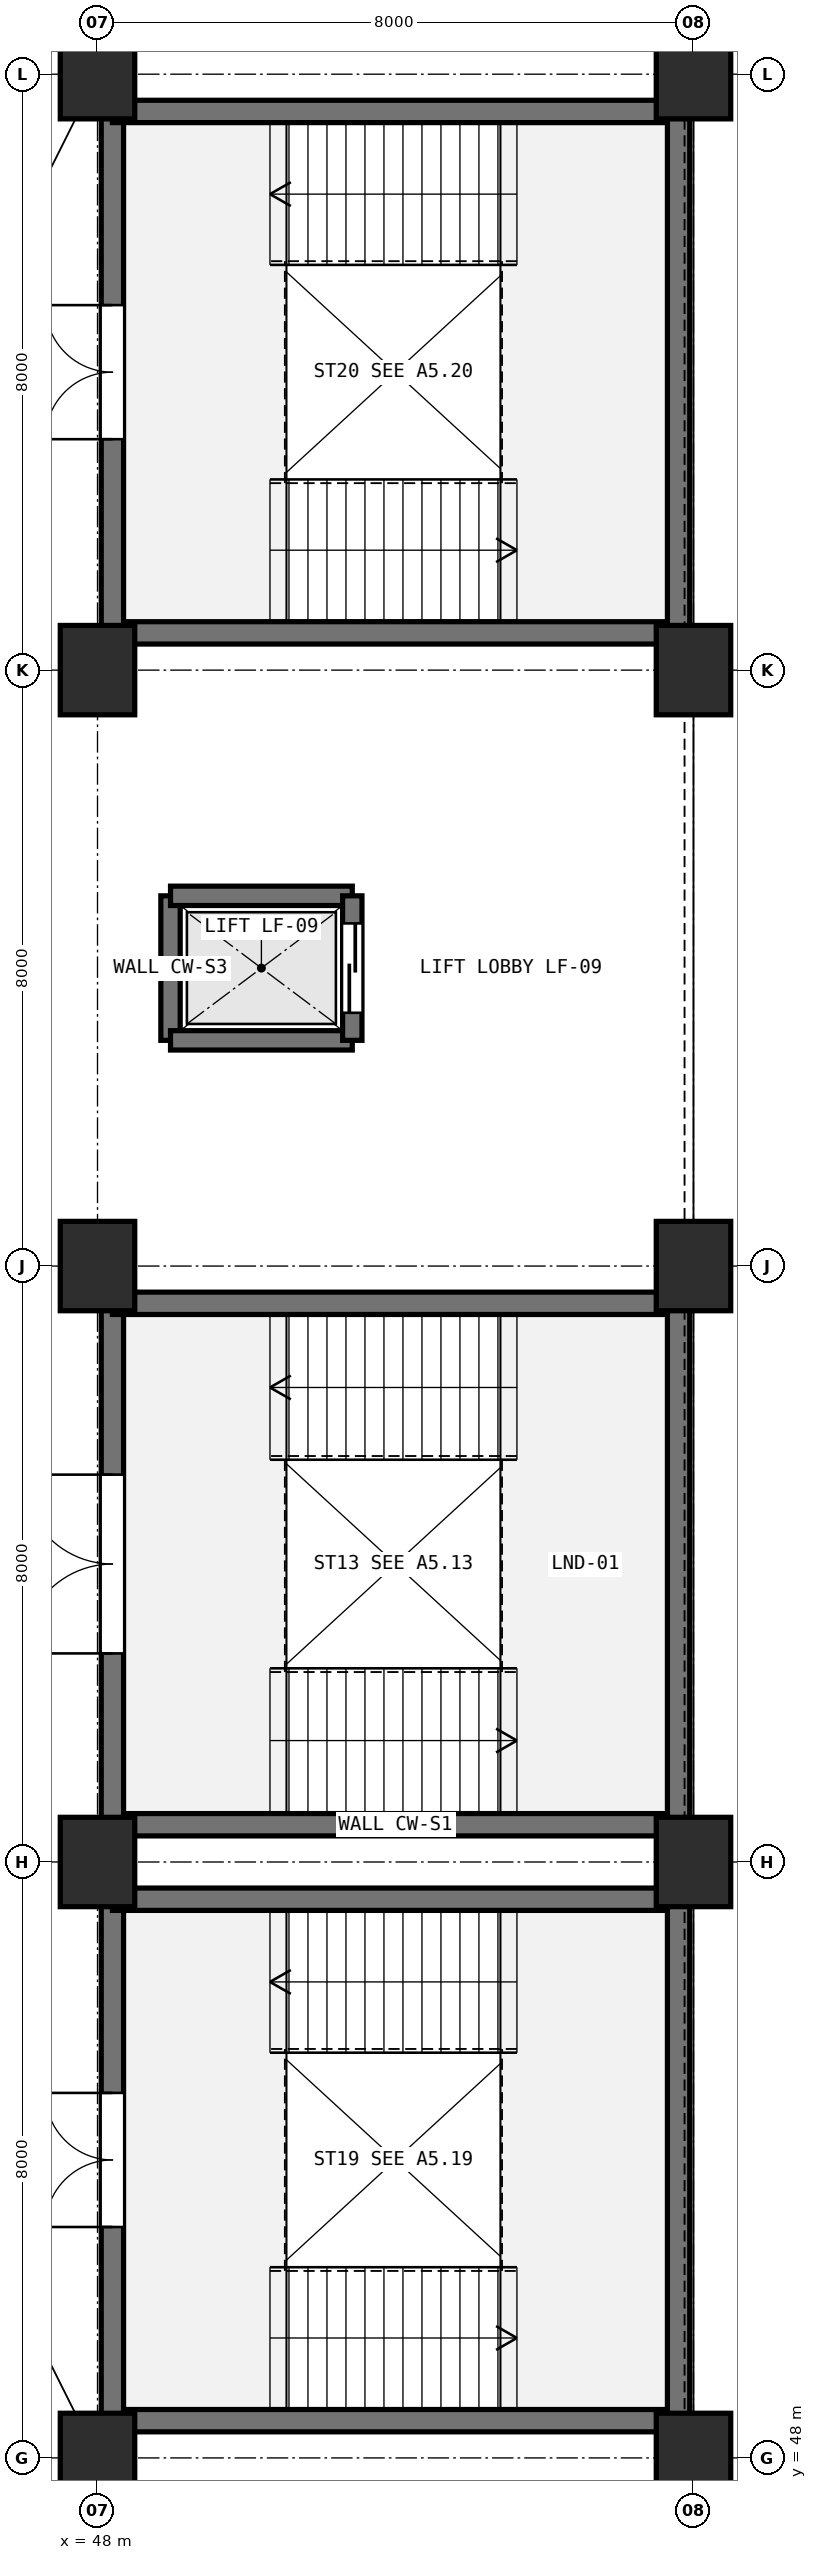
"""IFC4 building model, lengths in metres.
Left out: names, types, materials, properties, quantities, classifications, styles, units other than length and angle.
Written with IfcOpenShell. Run it as: python <this file> out.ifc"""

import sys

from ifc_helpers import new_model, si_unit, direction, frame, frame_2d, origin, origin_2d, place, context, subcontext, project, spatial, rectangle, extrude, element, fill, save


model = new_model("IFC4")
c1 = context("Model", 3, precision=1e-05, world=origin(), true_north=direction((0.0, 1.0)))
c2 = subcontext(c1, "Body", "Model", "MODEL_VIEW")
j1 = project(units=[si_unit("LENGTHUNIT", "METRE"), si_unit("PLANEANGLEUNIT", "RADIAN")], contexts=[c1])
p1 = place(None, origin())
s1 = spatial("IfcSite", under=j1, at=p1, CompositionType="ELEMENT")
p2 = place(p1, origin())
s2 = spatial("IfcBuilding", under=s1, at=p2, CompositionType="ELEMENT")
p3 = place(p2, frame((0.0, 0.0, 10.2)))
s3 = spatial("IfcBuildingStorey", under=s2, at=p3, CompositionType="ELEMENT", Elevation=10.2)
for number, where, z_axis, x_axis in (
    (1, (48.0, 48.0, 0.0), (0.0, 0.0, 1.0), (1.0, 0.0, 0.0)),
    (2, (48.0, 56.0, 0.0), (0.0, 0.0, 1.0), (1.0, 0.0, 0.0)),
    (3, (48.0, 64.0, 0.0), (0.0, 0.0, 1.0), (1.0, 0.0, 0.0)),
    (4, (48.0, 72.0, 0.0), (0.0, 0.0, 1.0), (1.0, 0.0, 0.0)),
    (5, (48.0, 80.0, 0.0), (0.0, 0.0, 1.0), (1.0, 0.0, 0.0)),
    (6, (56.0, 48.0, 0.0), (0.0, 0.0, 1.0), (1.0, 0.0, 0.0)),
    (7, (56.0, 56.0, 0.0), (0.0, 0.0, 1.0), (1.0, 0.0, 0.0)),
    (8, (56.0, 64.0, 0.0), (0.0, 0.0, 1.0), (1.0, 0.0, 0.0)),
    (9, (56.0, 72.0, 0.0), (0.0, 0.0, 1.0), (1.0, 0.0, 0.0)),
    (10, (56.0, 80.0, 0.0), (0.0, 0.0, 1.0), (1.0, 0.0, 0.0)),
):
    element("IfcColumn", number, at=place(p3, frame(where, z_axis=z_axis, x_axis=x_axis)), inside=s3, PredefinedType="COLUMN", context=c2, shape_type="SweptSolid", body=[
        extrude(rectangle(XDim=1.0, YDim=1.2, at=origin_2d()), origin(), (0.0, 0.0, 1.0), 4.8),
    ])
p4 = place(p3, frame((55.8, 56.5, 0.0), z_axis=(0.0, 0.0, 1.0), x_axis=(-1.0, 0.0, 0.0)))
e11 = element("IfcWall", 11, at=p4, inside=s3, PredefinedType="SHEAR", context=c2, shape_type="SweptSolid", body=[
    extrude(rectangle(XDim=7.6, YDim=0.3, at=frame_2d((3.8, 0.0))), origin(), (0.0, 0.0, 1.0), 4.46),
])
p5 = place(p3, frame((48.2, 56.5, 0.0), z_axis=(0.0, 0.0, 1.0), x_axis=(0.0, 1.0, 0.0)))
e12 = element("IfcWall", 12, at=p5, inside=s3, PredefinedType="SHEAR", context=c2, shape_type="SweptSolid", body=[
    extrude(rectangle(XDim=7.0, YDim=0.3, at=frame_2d((3.5, 0.0))), origin(), (0.0, 0.0, 1.0), 4.46),
])
p6 = place(p5, frame((2.3, 0.0, 0.0)))
e13 = element("IfcOpeningElement", 13, at=p6, cuts=e12, PredefinedType="OPENING", context=c2, shape_type="SweptSolid", body=[
    extrude(rectangle(XDim=2.4, YDim=2.2, at=frame_2d((1.2, 1.1))), frame((0.0, 0.16, 0.0), z_axis=(0.0, -1.0, 0.0), x_axis=(1.0, 0.0, 0.0)), (0.0, 0.0, 1.0), 0.32),
])
p7 = place(p3, frame((48.2, 63.5, 0.0), z_axis=(0.0, 0.0, 1.0), x_axis=(1.0, 0.0, 0.0)))
e14 = element("IfcWall", 14, at=p7, inside=s3, PredefinedType="SHEAR", context=c2, shape_type="SweptSolid", body=[
    extrude(rectangle(XDim=7.6, YDim=0.3, at=frame_2d((3.8, 0.0))), origin(), (0.0, 0.0, 1.0), 4.46),
])
p8 = place(p3, frame((55.8, 63.5, 0.0), z_axis=(0.0, 0.0, 1.0), x_axis=(0.0, -1.0, 0.0)))
e15 = element("IfcWall", 15, at=p8, inside=s3, PredefinedType="SHEAR", context=c2, shape_type="SweptSolid", body=[
    extrude(rectangle(XDim=7.0, YDim=0.3, at=frame_2d((3.5, 0.0))), origin(), (0.0, 0.0, 1.0), 4.46),
])
p9 = place(p3, frame((55.8, 48.5, 0.0), z_axis=(0.0, 0.0, 1.0), x_axis=(-1.0, 0.0, 0.0)))
e16 = element("IfcWall", 16, at=p9, inside=s3, PredefinedType="SHEAR", context=c2, shape_type="SweptSolid", body=[
    extrude(rectangle(XDim=7.6, YDim=0.3, at=frame_2d((3.8, 0.0))), origin(), (0.0, 0.0, 1.0), 4.46),
])
p10 = place(p3, frame((48.2, 48.5, 0.0), z_axis=(0.0, 0.0, 1.0), x_axis=(0.0, 1.0, 0.0)))
e17 = element("IfcWall", 17, at=p10, inside=s3, PredefinedType="SHEAR", context=c2, shape_type="SweptSolid", body=[
    extrude(rectangle(XDim=7.0, YDim=0.3, at=frame_2d((3.5, 0.0))), origin(), (0.0, 0.0, 1.0), 4.46),
])
p11 = place(p10, frame((2.6, 0.0, 0.0)))
e18 = element("IfcOpeningElement", 18, at=p11, cuts=e17, PredefinedType="OPENING", context=c2, shape_type="SweptSolid", body=[
    extrude(rectangle(XDim=1.8, YDim=2.2, at=frame_2d((0.9, 1.1))), frame((0.0, 0.16, 0.0), z_axis=(0.0, -1.0, 0.0), x_axis=(1.0, 0.0, 0.0)), (0.0, 0.0, 1.0), 0.32),
])
p12 = place(p3, frame((48.2, 55.5, 0.0), z_axis=(0.0, 0.0, 1.0), x_axis=(1.0, 0.0, 0.0)))
e19 = element("IfcWall", 19, at=p12, inside=s3, PredefinedType="SHEAR", context=c2, shape_type="SweptSolid", body=[
    extrude(rectangle(XDim=7.6, YDim=0.3, at=frame_2d((3.8, 0.0))), origin(), (0.0, 0.0, 1.0), 4.46),
])
p13 = place(p3, frame((55.8, 55.5, 0.0), z_axis=(0.0, 0.0, 1.0), x_axis=(0.0, -1.0, 0.0)))
e20 = element("IfcWall", 20, at=p13, inside=s3, PredefinedType="SHEAR", context=c2, shape_type="SweptSolid", body=[
    extrude(rectangle(XDim=7.0, YDim=0.3, at=frame_2d((3.5, 0.0))), origin(), (0.0, 0.0, 1.0), 4.46),
])
p14 = place(p3, frame((55.8, 72.5, 0.0), z_axis=(0.0, 0.0, 1.0), x_axis=(-1.0, 0.0, 0.0)))
e21 = element("IfcWall", 21, at=p14, inside=s3, PredefinedType="SHEAR", context=c2, shape_type="SweptSolid", body=[
    extrude(rectangle(XDim=7.6, YDim=0.3, at=frame_2d((3.8, 0.0))), origin(), (0.0, 0.0, 1.0), 4.46),
])
p15 = place(p3, frame((48.2, 72.5, 0.0), z_axis=(0.0, 0.0, 1.0), x_axis=(0.0, 1.0, 0.0)))
e22 = element("IfcWall", 22, at=p15, inside=s3, PredefinedType="SHEAR", context=c2, shape_type="SweptSolid", body=[
    extrude(rectangle(XDim=7.0, YDim=0.3, at=frame_2d((3.5, 0.0))), origin(), (0.0, 0.0, 1.0), 4.46),
])
p16 = place(p15, frame((2.6, 0.0, 0.0)))
e23 = element("IfcOpeningElement", 23, at=p16, cuts=e22, PredefinedType="OPENING", context=c2, shape_type="SweptSolid", body=[
    extrude(rectangle(XDim=1.8, YDim=2.2, at=frame_2d((0.9, 1.1))), frame((0.0, 0.16, 0.0), z_axis=(0.0, -1.0, 0.0), x_axis=(1.0, 0.0, 0.0)), (0.0, 0.0, 1.0), 0.32),
])
p17 = place(p3, frame((48.2, 79.5, 0.0), z_axis=(0.0, 0.0, 1.0), x_axis=(1.0, 0.0, 0.0)))
e24 = element("IfcWall", 24, at=p17, inside=s3, PredefinedType="SHEAR", context=c2, shape_type="SweptSolid", body=[
    extrude(rectangle(XDim=7.6, YDim=0.3, at=frame_2d((3.8, 0.0))), origin(), (0.0, 0.0, 1.0), 4.46),
])
p18 = place(p3, frame((55.8, 79.5, 0.0), z_axis=(0.0, 0.0, 1.0), x_axis=(0.0, -1.0, 0.0)))
e25 = element("IfcWall", 25, at=p18, inside=s3, PredefinedType="SHEAR", context=c2, shape_type="SweptSolid", body=[
    extrude(rectangle(XDim=7.0, YDim=0.3, at=frame_2d((3.5, 0.0))), origin(), (0.0, 0.0, 1.0), 4.46),
])
p19 = place(p3, frame((48.98, 67.03, 0.0), z_axis=(0.0, 0.0, 1.0), x_axis=(0.0, 1.0, 0.0)))
e26 = element("IfcWall", 26, at=p19, inside=s3, PredefinedType="SHEAR", context=c2, shape_type="SweptSolid", body=[
    extrude(rectangle(XDim=1.94, YDim=0.26, at=frame_2d((0.97, 0.0))), origin(), (0.0, 0.0, 1.0), 4.46),
])
for number, where, z_axis, x_axis in (
    (27, (48.98, 68.97, 0.0), (0.0, 0.0, 1.0), (1.0, 0.0, 0.0)),
    (28, (51.42, 67.03, 0.0), (0.0, 0.0, 1.0), (-1.0, 0.0, 0.0)),
):
    element("IfcWall", number, at=place(p3, frame(where, z_axis=z_axis, x_axis=x_axis)), inside=s3, PredefinedType="SHEAR", context=c2, shape_type="SweptSolid", body=[
        extrude(rectangle(XDim=2.44, YDim=0.26, at=frame_2d((1.22, 0.0))), origin(), (0.0, 0.0, 1.0), 4.46),
    ])
p20 = place(p3, frame((51.42, 68.97, 0.0), z_axis=(0.0, 0.0, 1.0), x_axis=(0.0, -1.0, 0.0)))
e29 = element("IfcWall", 29, at=p20, inside=s3, PredefinedType="SHEAR", context=c2, shape_type="SweptSolid", body=[
    extrude(rectangle(XDim=1.94, YDim=0.26, at=frame_2d((0.97, 0.0))), origin(), (0.0, 0.0, 1.0), 4.46),
])
p21 = place(p20, frame((0.37, 0.0, 0.0)))
e30 = element("IfcOpeningElement", 30, at=p21, cuts=e29, PredefinedType="OPENING", context=c2, shape_type="SweptSolid", body=[
    extrude(rectangle(XDim=1.2, YDim=2.15, at=frame_2d((0.6, 1.075))), frame((0.0, 0.14, 0.0), z_axis=(0.0, -1.0, 0.0), x_axis=(1.0, 0.0, 0.0)), (0.0, 0.0, 1.0), 0.28),
])
p22 = place(p6, frame((2.4, 0.0, 0.0), z_axis=(0.0, 0.0, 1.0), x_axis=(-1.0, 0.0, 0.0)))
e31 = element("IfcDoor", 31, at=p22, inside=s3, OperationType="DOUBLE_DOOR_SINGLE_SWING", PredefinedType="DOOR", context=c2, shape_type="SweptSolid", body=[
    extrude(rectangle(XDim=2.4, YDim=2.2, at=frame_2d((1.2, 1.1))), frame((0.0, 0.025, 0.0), z_axis=(0.0, -1.0, 0.0), x_axis=(1.0, 0.0, 0.0)), (0.0, 0.0, 1.0), 0.05),
])
fill(e13, e31)
p23 = place(p11, frame((1.8, 0.0, 0.0), z_axis=(0.0, 0.0, 1.0), x_axis=(-1.0, 0.0, 0.0)))
e32 = element("IfcDoor", 32, at=p23, inside=s3, OperationType="DOUBLE_DOOR_SINGLE_SWING", PredefinedType="DOOR", context=c2, shape_type="SweptSolid", body=[
    extrude(rectangle(XDim=1.8, YDim=2.2, at=frame_2d((0.9, 1.1))), frame((0.0, 0.025, 0.0), z_axis=(0.0, -1.0, 0.0), x_axis=(1.0, 0.0, 0.0)), (0.0, 0.0, 1.0), 0.05),
])
fill(e18, e32)
p24 = place(p16, frame((1.8, 0.0, 0.0), z_axis=(0.0, 0.0, 1.0), x_axis=(-1.0, 0.0, 0.0)))
e33 = element("IfcDoor", 33, at=p24, inside=s3, OperationType="DOUBLE_DOOR_SINGLE_SWING", PredefinedType="DOOR", context=c2, shape_type="SweptSolid", body=[
    extrude(rectangle(XDim=1.8, YDim=2.2, at=frame_2d((0.9, 1.1))), frame((0.0, 0.025, 0.0), z_axis=(0.0, -1.0, 0.0), x_axis=(1.0, 0.0, 0.0)), (0.0, 0.0, 1.0), 0.05),
])
fill(e23, e33)
p25 = place(p21, origin())
e34 = element("IfcDoor", 34, at=p25, inside=s3, OperationType="SLIDING_TO_LEFT", PredefinedType="DOOR", context=c2, shape_type="SweptSolid", body=[
    extrude(rectangle(XDim=1.2, YDim=2.15, at=frame_2d((0.6, 1.075))), frame((0.0, 0.025, 0.0), z_axis=(0.0, -1.0, 0.0), x_axis=(1.0, 0.0, 0.0)), (0.0, 0.0, 1.0), 0.05),
])
fill(e30, e34)
save(model, sys.argv[1])
